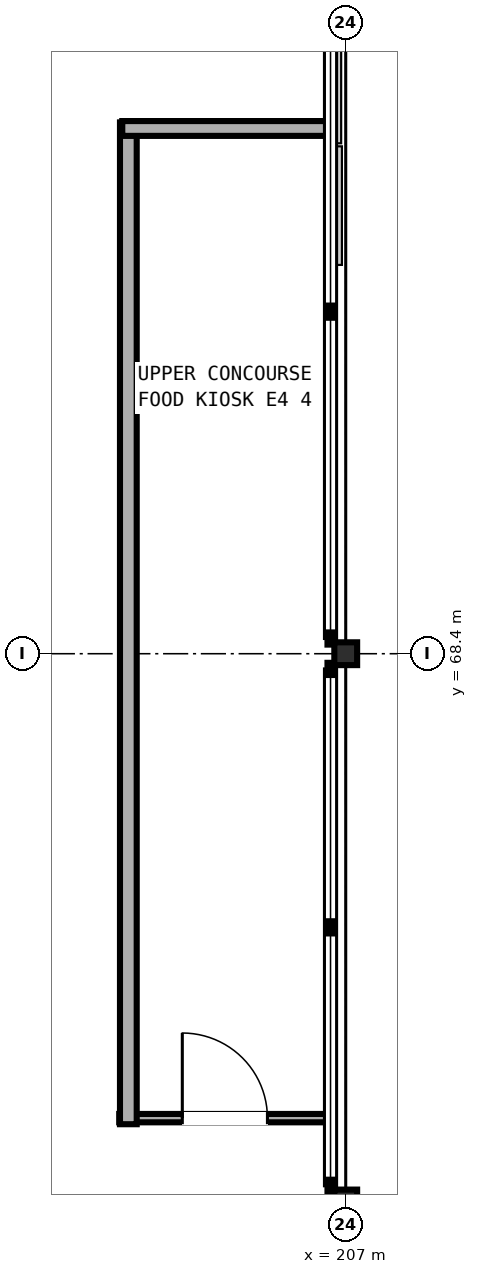
"""IFC4 building model, lengths in metres.
Left out: names, types, materials, properties, quantities, classifications, styles, units other than length and angle.
Written with IfcOpenShell. Run it as: python <this file> out.ifc"""

import sys

from ifc_helpers import new_model, si_unit, direction, frame, frame_2d, origin, origin_2d, place, context, subcontext, project, spatial, rectangle, hollow_rectangle, extrude, element, fill, save


model = new_model("IFC4")
c1 = context("Model", 3, precision=1e-05, world=origin(), true_north=direction((0.0, 1.0)))
c2 = subcontext(c1, "Body", "Model", "MODEL_VIEW")
j1 = project(units=[si_unit("LENGTHUNIT", "METRE"), si_unit("PLANEANGLEUNIT", "RADIAN")], contexts=[c1])
p1 = place(None, origin())
s1 = spatial("IfcSite", under=j1, at=p1, CompositionType="ELEMENT")
p2 = place(p1, origin())
s2 = spatial("IfcBuilding", under=s1, at=p2, CompositionType="ELEMENT")
p3 = place(p2, frame((0.0, 0.0, 19.2)))
s3 = spatial("IfcBuildingStorey", under=s2, at=p3, CompositionType="ELEMENT", Elevation=19.2)
for number, where, z_axis, x_axis in (
    (1, (207.0, 61.2, 0.0), (0.0, 0.0, 1.0), (1.0, 0.0, 0.0)),
    (2, (207.0, 68.4, 0.0), (0.0, 0.0, 1.0), (1.0, 0.0, 0.0)),
):
    element("IfcColumn", number, at=place(p3, frame(where, z_axis=z_axis, x_axis=x_axis)), inside=s3, PredefinedType="COLUMN", context=c2, shape_type="SweptSolid", body=[
        extrude(hollow_rectangle(XDim=0.3, YDim=0.3, WallThickness=0.012, at=origin_2d()), origin(), (0.0, 0.0, 1.0), 4.8),
    ])
p4 = place(p3, frame((204.02, 62.29, 0.0), z_axis=(0.0, 0.0, 1.0), x_axis=(1.0, 0.0, 0.0)))
e3 = element("IfcWall", 3, at=p4, inside=s3, PredefinedType="PARTITIONING", context=c2, shape_type="SweptSolid", body=[
    extrude(rectangle(XDim=2.78, YDim=0.11, at=frame_2d((1.39, 0.0))), origin(), (0.0, 0.0, 1.0), 3.28),
])
p5 = place(p4, frame((0.83, 0.0, 0.0)))
e4 = element("IfcOpeningElement", 4, at=p5, cuts=e3, PredefinedType="OPENING", context=c2, shape_type="SweptSolid", body=[
    extrude(rectangle(XDim=1.12, YDim=2.22, at=frame_2d((0.56, 1.11))), frame((0.0, 0.065, 0.0), z_axis=(0.0, -1.0, 0.0), x_axis=(1.0, 0.0, 0.0)), (0.0, 0.0, 1.0), 0.13),
])
p6 = place(p3, frame((204.14, 62.21, 0.0), z_axis=(0.0, 0.0, 1.0), x_axis=(0.0, 1.0, 0.0)))
e5 = element("IfcWall", 5, at=p6, inside=s3, PredefinedType="PARTITIONING", context=c2, shape_type="SweptSolid", body=[
    extrude(rectangle(XDim=13.18, YDim=0.22, at=frame_2d((6.59, 0.0))), origin(), (0.0, 0.0, 1.0), 3.28),
])
p7 = place(p3, frame((204.06, 75.31, 0.0), z_axis=(0.0, 0.0, 1.0), x_axis=(1.0, 0.0, 0.0)))
e6 = element("IfcWall", 6, at=p7, inside=s3, PredefinedType="PARTITIONING", context=c2, shape_type="SweptSolid", body=[
    extrude(rectangle(XDim=2.707, YDim=0.195, at=frame_2d((1.354, 0.0))), origin(), (0.0, 0.0, 1.0), 3.28),
])
p8 = place(p5, origin())
e7 = element("IfcDoor", 7, at=p8, inside=s3, OperationType="SINGLE_SWING_LEFT", PredefinedType="DOOR", context=c2, shape_type="SweptSolid", body=[
    extrude(rectangle(XDim=1.12, YDim=2.22, at=frame_2d((0.56, 1.11))), frame((0.0, 0.025, 0.0), z_axis=(0.0, -1.0, 0.0), x_axis=(1.0, 0.0, 0.0)), (0.0, 0.0, 1.0), 0.05),
])
fill(e4, e7)
save(model, sys.argv[1])
